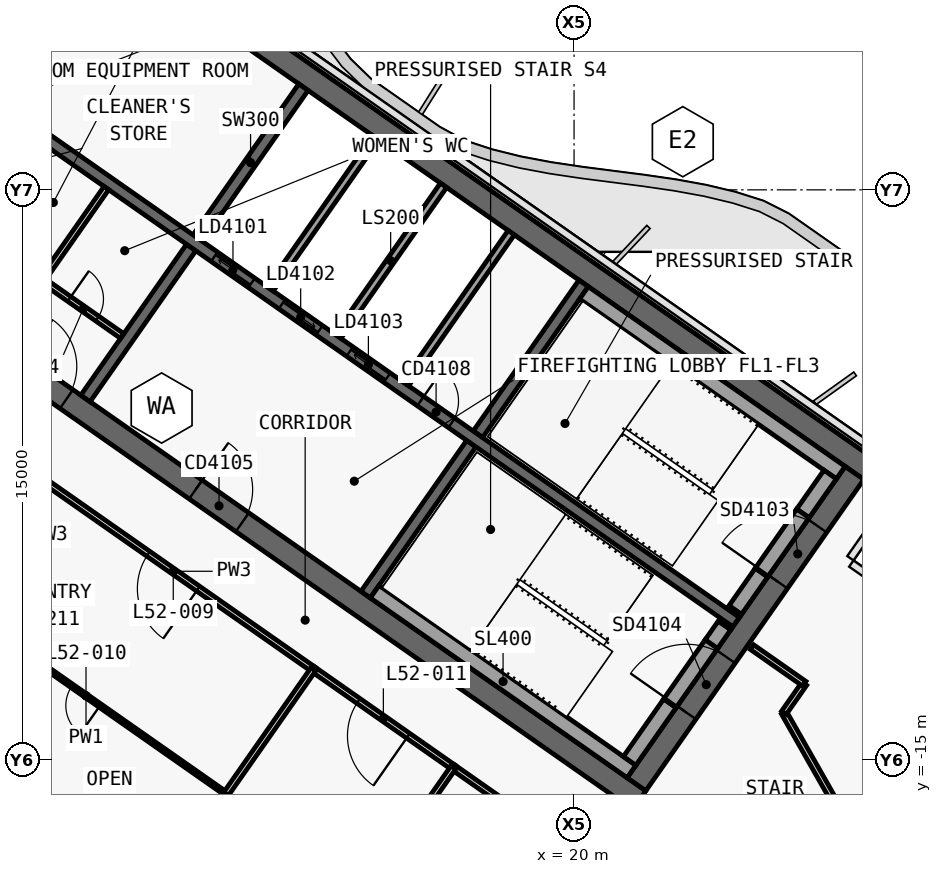
"""IFC4 building model, lengths in metres.
Left out: names, types, materials, properties, quantities, classifications, styles, units other than length and angle.
Written with IfcOpenShell. Run it as: python <this file> out.ifc"""

import sys

from ifc_helpers import new_model, si_unit, direction, frame, frame_2d, origin, place, context, subcontext, project, spatial, polyline, rectangle, outline, extrude, element, fill, save


model = new_model("IFC4")
c1 = context("Model", 3, precision=1e-05, world=origin(), true_north=direction((0.0, 1.0)))
c2 = subcontext(c1, "Body", "Model", "MODEL_VIEW")
j1 = project(units=[si_unit("LENGTHUNIT", "METRE"), si_unit("PLANEANGLEUNIT", "RADIAN")], contexts=[c1])
p1 = place(None, origin())
s1 = spatial("IfcSite", under=j1, at=p1, CompositionType="ELEMENT")
p2 = place(p1, origin())
s2 = spatial("IfcBuilding", under=s1, at=p2, CompositionType="ELEMENT")
p3 = place(p2, frame((0.0, 0.0, 225.4)))
s3 = spatial("IfcBuildingStorey", under=s2, at=p3, CompositionType="ELEMENT", Elevation=225.4)
p4 = place(p3, frame((0.028, 12.066, 0.0), z_axis=(0.0, 0.0, 1.0), x_axis=(0.819151382952, -0.573577380837, 0.0)))
e1 = element("IfcWall", 1, at=p4, inside=s3, PredefinedType="SHEAR", context=c2, shape_type="SweptSolid", body=[
    extrude(outline(polyline([(33.898, 0.3), (0.0, 0.3), (0.42, -0.3), (33.898, -0.3), (33.898, 0.3)])), origin(), (0.0, 0.0, 1.0), 3.9),
])
p5 = place(p3, frame((0.028, -0.874, 0.0), z_axis=(0.0, 0.0, 1.0), x_axis=(0.819150035022, -0.573579305871, 0.0)))
e2 = element("IfcWall", 2, at=p5, inside=s3, PredefinedType="SHEAR", context=c2, shape_type="SweptSolid", body=[
    extrude(outline(polyline([(26.476, 0.3), (0.0, 0.3), (0.42, -0.3), (26.476, -0.3), (26.476, 0.3)])), origin(), (0.0, 0.0, 1.0), 3.9),
])
p6 = place(p5, frame((6.576, 0.0, 0.0)))
e3 = element("IfcOpeningElement", 3, at=p6, cuts=e2, PredefinedType="OPENING", context=c2, shape_type="SweptSolid", body=[
    extrude(rectangle(XDim=1.5, YDim=2.1, at=frame_2d((0.75, 1.05))), frame((0.0, 0.31, 0.0), z_axis=(0.0, -1.0, 0.0), x_axis=(1.0, 0.0, 0.0)), (0.0, 0.0, 1.0), 0.62),
])
p7 = place(p5, frame((12.226, 0.0, 0.0)))
e4 = element("IfcOpeningElement", 4, at=p7, cuts=e2, PredefinedType="OPENING", context=c2, shape_type="SweptSolid", body=[
    extrude(rectangle(XDim=1.5, YDim=2.1, at=frame_2d((0.75, 1.05))), frame((0.0, 0.31, 0.0), z_axis=(0.0, -1.0, 0.0), x_axis=(1.0, 0.0, 0.0)), (0.0, 0.0, 1.0), 0.62),
])
p8 = place(p3, frame((21.642, -15.642, 0.0), z_axis=(0.0, 0.0, 1.0), x_axis=(0.573586866468, 0.819144740944, 0.0)))
e5 = element("IfcWall", 5, at=p8, inside=s3, PredefinedType="SHEAR", context=c2, shape_type="SweptSolid", body=[
    extrude(outline(polyline([(10.0, 0.3), (0.0, 0.3), (0.0, -0.3), (10.0, -0.3), (10.0, 0.3)])), origin(), (0.0, 0.0, 1.0), 3.9),
])
p9 = place(p8, frame((6.5, 0.0, 0.0)))
e6 = element("IfcOpeningElement", 6, at=p9, cuts=e5, PredefinedType="OPENING", context=c2, shape_type="SweptSolid", body=[
    extrude(rectangle(XDim=1.8, YDim=2.1, at=frame_2d((0.9, 1.05))), frame((0.0, 0.31, 0.0), z_axis=(0.0, -1.0, 0.0), x_axis=(1.0, 0.0, 0.0)), (0.0, 0.0, 1.0), 0.62),
])
p10 = place(p8, frame((2.3, 0.0, 0.0)))
e7 = element("IfcOpeningElement", 7, at=p10, cuts=e5, PredefinedType="OPENING", context=c2, shape_type="SweptSolid", body=[
    extrude(rectangle(XDim=1.8, YDim=2.1, at=frame_2d((0.9, 1.05))), frame((0.0, 0.31, 0.0), z_axis=(0.0, -1.0, 0.0), x_axis=(1.0, 0.0, 0.0)), (0.0, 0.0, 1.0), 0.62),
])
p11 = place(p3, frame((7.143, -5.49, 0.0), z_axis=(0.0, 0.0, 1.0), x_axis=(0.573617744349, 0.819123118565, 0.0)))
e8 = element("IfcWall", 8, at=p11, inside=s3, PredefinedType="SHEAR", context=c2, shape_type="SweptSolid", body=[
    extrude(outline(polyline([(0.0, 0.15), (0.0, -0.15), (4.85, -0.15), (4.85, 0.15), (0.0, 0.15)])), origin(), (0.0, 0.0, 1.0), 3.9),
])
p12 = place(p3, frame((10.097, -1.271, 0.0), z_axis=(0.0, 0.0, 1.0), x_axis=(0.573560315113, 0.819163332265, 0.0)))
e9 = element("IfcWall", 9, at=p12, inside=s3, PredefinedType="SHEAR", context=c2, shape_type="SweptSolid", body=[
    extrude(outline(polyline([(4.85, -0.15), (4.85, 0.15), (0.0, 0.15), (0.0, -0.15), (4.85, -0.15)])), origin(), (0.0, 0.0, 1.0), 3.9),
])
p13 = place(p3, frame((14.515, -10.652, 0.0), z_axis=(0.0, 0.0, 1.0), x_axis=(0.573560315113, 0.819163332265, 0.0)))
e10 = element("IfcWall", 10, at=p13, inside=s3, PredefinedType="SHEAR", context=c2, shape_type="SweptSolid", body=[
    extrude(outline(polyline([(0.0, 0.15), (0.0, -0.15), (4.85, -0.15), (4.85, 0.15), (0.0, 0.15)])), origin(), (0.0, 0.0, 1.0), 3.9),
])
p14 = place(p3, frame((17.469, -6.433, 0.0), z_axis=(0.0, 0.0, 1.0), x_axis=(0.573594092424, 0.81913968109, 0.0)))
e11 = element("IfcWall", 11, at=p14, inside=s3, PredefinedType="SHEAR", context=c2, shape_type="SweptSolid", body=[
    extrude(outline(polyline([(4.85, -0.15), (4.85, 0.15), (0.0, 0.15), (0.0, -0.15), (4.85, -0.15)])), origin(), (0.0, 0.0, 1.0), 3.9),
])
p15 = place(p3, frame((2.638, 3.768, 0.0), z_axis=(0.0, 0.0, 1.0), x_axis=(0.819155014212, -0.573572194837, 0.0)))
e12 = element("IfcWall", 12, at=p15, inside=s3, PredefinedType="SHEAR", context=c2, shape_type="SweptSolid", body=[
    extrude(outline(polyline([(0.0, 0.15), (0.0, -0.15), (26.4, -0.15), (26.4, 0.15), (0.0, 0.15)])), origin(), (0.0, 0.0, 1.0), 3.9),
])
p16 = place(p15, frame((9.637, 0.0, 0.0)))
e13 = element("IfcOpeningElement", 13, at=p16, cuts=e12, PredefinedType="OPENING", context=c2, shape_type="SweptSolid", body=[
    extrude(rectangle(XDim=1.2, YDim=2.1, at=frame_2d((0.6, 1.05))), frame((0.0, 0.16, 0.0), z_axis=(0.0, -1.0, 0.0), x_axis=(1.0, 0.0, 0.0)), (0.0, 0.0, 1.0), 0.32),
])
p17 = place(p15, frame((11.812, 0.0, 0.0)))
e14 = element("IfcOpeningElement", 14, at=p17, cuts=e12, PredefinedType="OPENING", context=c2, shape_type="SweptSolid", body=[
    extrude(rectangle(XDim=1.2, YDim=2.1, at=frame_2d((0.6, 1.05))), frame((0.0, 0.16, 0.0), z_axis=(0.0, -1.0, 0.0), x_axis=(1.0, 0.0, 0.0)), (0.0, 0.0, 1.0), 0.32),
])
p18 = place(p15, frame((13.988, 0.0, 0.0)))
e15 = element("IfcOpeningElement", 15, at=p18, cuts=e12, PredefinedType="OPENING", context=c2, shape_type="SweptSolid", body=[
    extrude(rectangle(XDim=1.2, YDim=2.1, at=frame_2d((0.6, 1.05))), frame((0.0, 0.16, 0.0), z_axis=(0.0, -1.0, 0.0), x_axis=(1.0, 0.0, 0.0)), (0.0, 0.0, 1.0), 0.32),
])
p19 = place(p15, frame((16.262, 0.0, 0.0)))
e16 = element("IfcOpeningElement", 16, at=p19, cuts=e12, PredefinedType="OPENING", context=c2, shape_type="SweptSolid", body=[
    extrude(rectangle(XDim=1.0, YDim=2.1, at=frame_2d((0.5, 1.05))), frame((0.0, 0.16, 0.0), z_axis=(0.0, -1.0, 0.0), x_axis=(1.0, 0.0, 0.0)), (0.0, 0.0, 1.0), 0.32),
])
p20 = place(p3, frame((12.001, -2.605, 0.0), z_axis=(0.0, 0.0, 1.0), x_axis=(0.573560315113, 0.819163332265, 0.0)))
e17 = element("IfcWall", 17, at=p20, inside=s3, PredefinedType="SOLIDWALL", context=c2, shape_type="SweptSolid", body=[
    extrude(rectangle(XDim=4.85, YDim=0.2, at=frame_2d((2.425, 0.0))), origin(), (0.0, 0.0, 1.0), 3.9),
])
p21 = place(p3, frame((13.783, -3.852, 0.0), z_axis=(0.0, 0.0, 1.0), x_axis=(0.573594092424, 0.81913968109, 0.0)))
e18 = element("IfcWall", 18, at=p21, inside=s3, PredefinedType="SOLIDWALL", context=c2, shape_type="SweptSolid", body=[
    extrude(rectangle(XDim=4.85, YDim=0.2, at=frame_2d((2.425, 0.0))), origin(), (0.0, 0.0, 1.0), 3.9),
])
p22 = place(p3, frame((15.565, -5.1, 0.0), z_axis=(0.0, 0.0, 1.0), x_axis=(0.573560315113, 0.819163332265, 0.0)))
e19 = element("IfcWall", 19, at=p22, inside=s3, PredefinedType="SOLIDWALL", context=c2, shape_type="SweptSolid", body=[
    extrude(rectangle(XDim=4.85, YDim=0.2, at=frame_2d((2.425, 0.0))), origin(), (0.0, 0.0, 1.0), 3.9),
])
p23 = place(p3, frame((1.516, 0.77, 0.0), z_axis=(0.0, 0.0, 1.0), x_axis=(0.819146424436, -0.573584462249, 0.0)))
e20 = element("IfcWall", 20, at=p23, inside=s3, PredefinedType="PARTITIONING", context=c2, shape_type="SweptSolid", body=[
    extrude(rectangle(XDim=8.05, YDim=0.15, at=frame_2d((4.025, 0.0))), origin(), (0.0, 0.0, 1.0), 3.62),
])
p24 = place(p23, frame((0.7, 0.0, 0.0)))
e21 = element("IfcOpeningElement", 21, at=p24, cuts=e20, PredefinedType="OPENING", context=c2, shape_type="SweptSolid", body=[
    extrude(rectangle(XDim=0.9, YDim=2.1, at=frame_2d((0.45, 1.05))), frame((0.0, 0.085, 0.0), z_axis=(0.0, -1.0, 0.0), x_axis=(1.0, 0.0, 0.0)), (0.0, 0.0, 1.0), 0.17),
])
p25 = place(p23, frame((2.6, 0.0, 0.0)))
e22 = element("IfcOpeningElement", 22, at=p25, cuts=e20, PredefinedType="OPENING", context=c2, shape_type="SweptSolid", body=[
    extrude(rectangle(XDim=0.8, YDim=2.1, at=frame_2d((0.4, 1.05))), frame((0.0, 0.085, 0.0), z_axis=(0.0, -1.0, 0.0), x_axis=(1.0, 0.0, 0.0)), (0.0, 0.0, 1.0), 0.17),
])
p26 = place(p23, frame((4.1, 0.0, 0.0)))
e23 = element("IfcOpeningElement", 23, at=p26, cuts=e20, PredefinedType="OPENING", context=c2, shape_type="SweptSolid", body=[
    extrude(rectangle(XDim=0.9, YDim=2.1, at=frame_2d((0.45, 1.05))), frame((0.0, 0.085, 0.0), z_axis=(0.0, -1.0, 0.0), x_axis=(1.0, 0.0, 0.0)), (0.0, 0.0, 1.0), 0.17),
])
p27 = place(p23, frame((6.35, 0.0, 0.0)))
e24 = element("IfcOpeningElement", 24, at=p27, cuts=e20, PredefinedType="OPENING", context=c2, shape_type="SweptSolid", body=[
    extrude(rectangle(XDim=0.9, YDim=2.1, at=frame_2d((0.45, 1.05))), frame((0.0, 0.085, 0.0), z_axis=(0.0, -1.0, 0.0), x_axis=(1.0, 0.0, 0.0)), (0.0, 0.0, 1.0), 0.17),
])
p28 = place(p3, frame((6.044, -2.309, 0.0), z_axis=(0.0, 0.0, 1.0), x_axis=(0.573564930514, 0.819160100642, 0.0)))
e25 = element("IfcWall", 25, at=p28, inside=s3, PredefinedType="PARTITIONING", context=c2, shape_type="SweptSolid", body=[
    extrude(rectangle(XDim=2.875, YDim=0.15, at=frame_2d((1.438, 0.0))), origin(), (0.0, 0.0, 1.0), 3.62),
])
p29 = place(p3, frame((20.259, -2.71, 0.0), z_axis=(0.0, 0.0, 1.0), x_axis=(0.81914849389, -0.573581506813, 0.0)))
e26 = element("IfcWall", 26, at=p29, inside=s3, PredefinedType="SOLIDWALL", context=c2, shape_type="SweptSolid", body=[
    extrude(rectangle(XDim=8.25, YDim=0.4, at=frame_2d((4.125, 0.0))), origin(), (0.0, 0.0, 1.0), 3.62),
])
p30 = place(p3, frame((24.244, -11.055, 0.0), z_axis=(0.0, 0.0, 1.0), x_axis=(0.573571582932, 0.819155442668, 0.0)))
e27 = element("IfcWall", 27, at=p30, inside=s3, PredefinedType="SOLIDWALL", context=c2, shape_type="SweptSolid", body=[
    extrude(rectangle(XDim=1.2, YDim=0.4, at=frame_2d((0.6, 0.0))), origin(), (0.0, 0.0, 1.0), 3.62),
])
p31 = place(p3, frame((26.022, -8.515, 0.0), z_axis=(0.0, 0.0, 1.0), x_axis=(0.573619628835, 0.819121798889, 0.0)))
e28 = element("IfcWall", 28, at=p31, inside=s3, PredefinedType="SOLIDWALL", context=c2, shape_type="SweptSolid", body=[
    extrude(rectangle(XDim=1.25, YDim=0.4, at=frame_2d((0.625, 0.0))), origin(), (0.0, 0.0, 1.0), 3.62),
])
p32 = place(p3, frame((24.932, -10.072, 2.15), z_axis=(0.0, 0.0, 1.0), x_axis=(0.573591692345, 0.819141361715, 0.0)))
e29 = element("IfcWall", 29, at=p32, inside=s3, PredefinedType="SOLIDWALL", context=c2, shape_type="SweptSolid", body=[
    extrude(rectangle(XDim=1.9, YDim=0.4, at=frame_2d((0.95, 0.0))), origin(), (0.0, 0.0, 1.0), 1.47),
])
p33 = place(p3, frame((14.753, -10.574, 0.0), z_axis=(0.0, 0.0, 1.0), x_axis=(0.819158229677, -0.573567602601, 0.0)))
e30 = element("IfcWall", 30, at=p33, inside=s3, PredefinedType="SOLIDWALL", context=c2, shape_type="SweptSolid", body=[
    extrude(rectangle(XDim=8.25, YDim=0.4, at=frame_2d((4.125, 0.0))), origin(), (0.0, 0.0, 1.0), 3.62),
])
p34 = place(p3, frame((21.462, -15.028, 0.0), z_axis=(0.0, 0.0, 1.0), x_axis=(0.573559770908, 0.819163713305, 0.0)))
e31 = element("IfcWall", 31, at=p34, inside=s3, PredefinedType="SOLIDWALL", context=c2, shape_type="SweptSolid", body=[
    extrude(rectangle(XDim=1.85, YDim=0.4, at=frame_2d((0.925, 0.0))), origin(), (0.0, 0.0, 1.0), 3.62),
])
p35 = place(p3, frame((23.613, -11.956, 0.0), z_axis=(0.0, 0.0, 1.0), x_axis=(0.573435029941, 0.819251039936, 0.0)))
e32 = element("IfcWall", 32, at=p35, inside=s3, PredefinedType="SOLIDWALL", context=c2, shape_type="SweptSolid", body=[
    extrude(rectangle(XDim=0.6, YDim=0.4, at=frame_2d((0.3, 0.0))), origin(), (0.0, 0.0, 1.0), 3.62),
])
p36 = place(p3, frame((22.523, -13.512, 2.15), z_axis=(0.0, 0.0, 1.0), x_axis=(0.573591692345, 0.819141361715, 0.0)))
e33 = element("IfcWall", 33, at=p36, inside=s3, PredefinedType="SOLIDWALL", context=c2, shape_type="SweptSolid", body=[
    extrude(rectangle(XDim=1.9, YDim=0.4, at=frame_2d((0.95, 0.0))), origin(), (0.0, 0.0, 1.0), 1.47),
])
p37 = place(p3, frame((13.14, -12.619, 0.0), z_axis=(0.0, 0.0, 1.0), x_axis=(-0.81915291695, 0.57357519006, 0.0)))
e34 = element("IfcWall", 34, at=p37, inside=s3, PredefinedType="PARTITIONING", context=c2, shape_type="SweptSolid", body=[
    extrude(rectangle(XDim=9.002, YDim=0.15, at=frame_2d((4.501, 0.0))), origin(), (0.0, 0.0, 1.0), 3.05),
])
p38 = place(p37, frame((3.701, 0.0, 0.0)))
e35 = element("IfcOpeningElement", 35, at=p38, cuts=e34, PredefinedType="OPENING", context=c2, shape_type="SweptSolid", body=[
    extrude(rectangle(XDim=1.6, YDim=2.1, at=frame_2d((0.8, 1.05))), frame((0.0, 0.085, 0.0), z_axis=(0.0, -1.0, 0.0), x_axis=(1.0, 0.0, 0.0)), (0.0, 0.0, 1.0), 0.17),
])
p39 = place(p3, frame((16.826, -15.2, 0.0), z_axis=(0.0, 0.0, 1.0), x_axis=(-0.819147870025, 0.573582397772, 0.0)))
e36 = element("IfcWall", 36, at=p39, inside=s3, PredefinedType="PARTITIONING", context=c2, shape_type="SweptSolid", body=[
    extrude(rectangle(XDim=4.504, YDim=0.15, at=frame_2d((2.252, 0.0))), origin(), (0.0, 0.0, 1.0), 3.05),
])
p40 = place(p39, frame((1.452, 0.0, 0.0)))
e37 = element("IfcOpeningElement", 37, at=p40, cuts=e36, PredefinedType="OPENING", context=c2, shape_type="SweptSolid", body=[
    extrude(rectangle(XDim=1.6, YDim=2.1, at=frame_2d((0.8, 1.05))), frame((0.0, 0.085, 0.0), z_axis=(0.0, -1.0, 0.0), x_axis=(1.0, 0.0, 0.0)), (0.0, 0.0, 1.0), 0.17),
])
p41 = place(p3, frame((22.97, -19.502, 0.0), z_axis=(0.0, 0.0, 1.0), x_axis=(-0.819149375276, 0.573580248078, 0.0)))
e38 = element("IfcWall", 38, at=p41, inside=s3, PredefinedType="PARTITIONING", context=c2, shape_type="SweptSolid", body=[
    extrude(rectangle(XDim=7.504, YDim=0.15, at=frame_2d((3.752, 0.0))), origin(), (0.0, 0.0, 1.0), 3.05),
])
p42 = place(p41, frame((2.952, 0.0, 0.0)))
e39 = element("IfcOpeningElement", 39, at=p42, cuts=e38, PredefinedType="OPENING", context=c2, shape_type="SweptSolid", body=[
    extrude(rectangle(XDim=1.6, YDim=2.1, at=frame_2d((0.8, 1.05))), frame((0.0, 0.085, 0.0), z_axis=(0.0, -1.0, 0.0), x_axis=(1.0, 0.0, 0.0)), (0.0, 0.0, 1.0), 0.17),
])
p43 = place(p3, frame((29.617, -20.966, 0.0), z_axis=(0.0, 0.0, 1.0), x_axis=(-0.493827705015, 0.86955977239, 0.0)))
e40 = element("IfcWall", 40, at=p43, inside=s3, PredefinedType="PARTITIONING", context=c2, shape_type="SweptSolid", body=[
    extrude(rectangle(XDim=8.288, YDim=0.15, at=frame_2d((4.144, 0.0))), origin(), (0.0, 0.0, 1.0), 3.0),
])
p44 = place(p43, frame((3.694, 0.0, 0.0)))
e41 = element("IfcOpeningElement", 41, at=p44, cuts=e40, PredefinedType="OPENING", context=c2, shape_type="SweptSolid", body=[
    extrude(rectangle(XDim=0.9, YDim=2.1, at=frame_2d((0.45, 1.05))), frame((0.0, 0.085, 0.0), z_axis=(0.0, -1.0, 0.0), x_axis=(1.0, 0.0, 0.0)), (0.0, 0.0, 1.0), 0.17),
])
p45 = place(p3, frame((25.524, -13.759, 0.0), z_axis=(0.0, 0.0, 1.0), x_axis=(0.573497542524, 0.81920728068, 0.0)))
e42 = element("IfcWall", 42, at=p45, inside=s3, PredefinedType="PARTITIONING", context=c2, shape_type="SweptSolid", body=[
    extrude(rectangle(XDim=0.931, YDim=0.15, at=frame_2d((0.465, 0.0))), origin(), (0.0, 0.0, 1.0), 3.62),
])
p46 = place(p3, frame((26.058, -12.997, 0.0), z_axis=(0.0, 0.0, 1.0), x_axis=(-0.819109000826, 0.573637903879, 0.0)))
e43 = element("IfcWall", 43, at=p46, inside=s3, PredefinedType="PARTITIONING", context=c2, shape_type="SweptSolid", body=[
    extrude(rectangle(XDim=1.68, YDim=0.15, at=frame_2d((0.84, 0.0))), origin(), (0.0, 0.0, 1.0), 3.62),
])
p47 = place(p3, frame((10.844, -15.896, 0.0), z_axis=(0.0, 0.0, 1.0), x_axis=(-0.819141427692, 0.573591598124, 0.0)))
e44 = element("IfcWall", 44, at=p47, inside=s3, PredefinedType="PARTITIONING", context=c2, shape_type="SweptSolid", body=[
    extrude(rectangle(XDim=9.0, YDim=0.1, at=frame_2d((4.5, 0.0))), origin(), (0.0, 0.0, 1.0), 3.05),
])
p48 = place(p47, frame((4.05, 0.0, 0.0)))
e45 = element("IfcOpeningElement", 45, at=p48, cuts=e44, PredefinedType="OPENING", context=c2, shape_type="SweptSolid", body=[
    extrude(rectangle(XDim=0.9, YDim=2.1, at=frame_2d((0.45, 1.05))), frame((0.0, 0.06, 0.0), z_axis=(0.0, -1.0, 0.0), x_axis=(1.0, 0.0, 0.0)), (0.0, 0.0, 1.0), 0.12),
])
p49 = place(p3, frame((10.844, -15.896, 0.0), z_axis=(0.0, 0.0, 1.0), x_axis=(-0.573555012677, -0.819167044889, 0.0)))
e46 = element("IfcWall", 46, at=p49, inside=s3, PredefinedType="PARTITIONING", context=c2, shape_type="SweptSolid", body=[
    extrude(rectangle(XDim=2.829, YDim=0.15, at=frame_2d((1.415, 0.0))), origin(), (0.0, 0.0, 1.0), 3.05),
])
p50 = place(p3, frame((13.139, -12.618, 0.0), z_axis=(0.0, 0.0, 1.0), x_axis=(-0.573556557423, -0.819165963305, 0.0)))
e47 = element("IfcWall", 47, at=p50, inside=s3, PredefinedType="PARTITIONING", context=c2, shape_type="SweptSolid", body=[
    extrude(rectangle(XDim=4.0, YDim=0.15, at=frame_2d((2.0, 0.0))), origin(), (0.0, 0.0, 1.0), 3.05),
])
p51 = place(p3, frame((16.825, -15.199, 0.0), z_axis=(0.0, 0.0, 1.0), x_axis=(-0.573589265117, -0.819143061341, 0.0)))
e48 = element("IfcWall", 48, at=p51, inside=s3, PredefinedType="PARTITIONING", context=c2, shape_type="SweptSolid", body=[
    extrude(rectangle(XDim=4.002, YDim=0.15, at=frame_2d((2.001, 0.0))), origin(), (0.0, 0.0, 1.0), 3.62),
])
p52 = place(p16, origin())
e49 = element("IfcDoor", 49, at=p52, inside=s3, OperationType="SLIDING_TO_LEFT", PredefinedType="DOOR", context=c2, shape_type="SweptSolid", body=[
    extrude(rectangle(XDim=1.2, YDim=2.1, at=frame_2d((0.6, 1.05))), frame((0.0, 0.025, 0.0), z_axis=(0.0, -1.0, 0.0), x_axis=(1.0, 0.0, 0.0)), (0.0, 0.0, 1.0), 0.05),
])
fill(e13, e49)
p53 = place(p17, origin())
e50 = element("IfcDoor", 50, at=p53, inside=s3, OperationType="SLIDING_TO_RIGHT", PredefinedType="DOOR", context=c2, shape_type="SweptSolid", body=[
    extrude(rectangle(XDim=1.2, YDim=2.1, at=frame_2d((0.6, 1.05))), frame((0.0, 0.025, 0.0), z_axis=(0.0, -1.0, 0.0), x_axis=(1.0, 0.0, 0.0)), (0.0, 0.0, 1.0), 0.05),
])
fill(e14, e50)
p54 = place(p18, origin())
e51 = element("IfcDoor", 51, at=p54, inside=s3, OperationType="SLIDING_TO_LEFT", PredefinedType="DOOR", context=c2, shape_type="SweptSolid", body=[
    extrude(rectangle(XDim=1.2, YDim=2.1, at=frame_2d((0.6, 1.05))), frame((0.0, 0.025, 0.0), z_axis=(0.0, -1.0, 0.0), x_axis=(1.0, 0.0, 0.0)), (0.0, 0.0, 1.0), 0.05),
])
fill(e15, e51)
p55 = place(p19, origin())
e52 = element("IfcDoor", 52, at=p55, inside=s3, OperationType="SINGLE_SWING_RIGHT", PredefinedType="DOOR", context=c2, shape_type="SweptSolid", body=[
    extrude(rectangle(XDim=1.0, YDim=2.1, at=frame_2d((0.5, 1.05))), frame((0.0, 0.025, 0.0), z_axis=(0.0, -1.0, 0.0), x_axis=(1.0, 0.0, 0.0)), (0.0, 0.0, 1.0), 0.05),
])
fill(e16, e52)
p56 = place(p27, origin())
e53 = element("IfcDoor", 53, at=p56, inside=s3, OperationType="SINGLE_SWING_RIGHT", PredefinedType="DOOR", context=c2, shape_type="SweptSolid", body=[
    extrude(rectangle(XDim=0.9, YDim=2.1, at=frame_2d((0.45, 1.05))), frame((0.0, 0.025, 0.0), z_axis=(0.0, -1.0, 0.0), x_axis=(1.0, 0.0, 0.0)), (0.0, 0.0, 1.0), 0.05),
])
fill(e24, e53)
p57 = place(p6, origin())
e54 = element("IfcDoor", 54, at=p57, inside=s3, OperationType="SINGLE_SWING_RIGHT", PredefinedType="DOOR", context=c2, shape_type="SweptSolid", body=[
    extrude(rectangle(XDim=1.5, YDim=2.1, at=frame_2d((0.75, 1.05))), frame((0.0, 0.025, 0.0), z_axis=(0.0, -1.0, 0.0), x_axis=(1.0, 0.0, 0.0)), (0.0, 0.0, 1.0), 0.05),
])
fill(e3, e54)
p58 = place(p7, origin())
e55 = element("IfcDoor", 55, at=p58, inside=s3, OperationType="DOUBLE_DOOR_SINGLE_SWING", PredefinedType="DOOR", context=c2, shape_type="SweptSolid", body=[
    extrude(rectangle(XDim=1.5, YDim=2.1, at=frame_2d((0.75, 1.05))), frame((0.0, 0.025, 0.0), z_axis=(0.0, -1.0, 0.0), x_axis=(1.0, 0.0, 0.0)), (0.0, 0.0, 1.0), 0.05),
])
fill(e4, e55)
p59 = place(p9, origin())
e56 = element("IfcDoor", 56, at=p59, inside=s3, OperationType="DOUBLE_DOOR_SINGLE_SWING", PredefinedType="DOOR", context=c2, shape_type="SweptSolid", body=[
    extrude(rectangle(XDim=1.8, YDim=2.1, at=frame_2d((0.9, 1.05))), frame((0.0, 0.025, 0.0), z_axis=(0.0, -1.0, 0.0), x_axis=(1.0, 0.0, 0.0)), (0.0, 0.0, 1.0), 0.05),
])
fill(e6, e56)
p60 = place(p10, origin())
e57 = element("IfcDoor", 57, at=p60, inside=s3, OperationType="DOUBLE_DOOR_SINGLE_SWING", PredefinedType="DOOR", context=c2, shape_type="SweptSolid", body=[
    extrude(rectangle(XDim=1.8, YDim=2.1, at=frame_2d((0.9, 1.05))), frame((0.0, 0.025, 0.0), z_axis=(0.0, -1.0, 0.0), x_axis=(1.0, 0.0, 0.0)), (0.0, 0.0, 1.0), 0.05),
])
fill(e7, e57)
p61 = place(p38, origin())
e58 = element("IfcDoor", 58, at=p61, inside=s3, OperationType="DOUBLE_DOOR_SINGLE_SWING", PredefinedType="DOOR", context=c2, shape_type="SweptSolid", body=[
    extrude(rectangle(XDim=1.6, YDim=2.1, at=frame_2d((0.8, 1.05))), frame((0.0, 0.025, 0.0), z_axis=(0.0, -1.0, 0.0), x_axis=(1.0, 0.0, 0.0)), (0.0, 0.0, 1.0), 0.05),
])
fill(e35, e58)
p62 = place(p48, origin())
e59 = element("IfcDoor", 59, at=p62, inside=s3, OperationType="SINGLE_SWING_LEFT", PredefinedType="DOOR", context=c2, shape_type="SweptSolid", body=[
    extrude(rectangle(XDim=0.9, YDim=2.1, at=frame_2d((0.45, 1.05))), frame((0.0, 0.025, 0.0), z_axis=(0.0, -1.0, 0.0), x_axis=(1.0, 0.0, 0.0)), (0.0, 0.0, 1.0), 0.05),
])
fill(e45, e59)
p63 = place(p40, origin())
e60 = element("IfcDoor", 60, at=p63, inside=s3, OperationType="DOUBLE_DOOR_SINGLE_SWING", PredefinedType="DOOR", context=c2, shape_type="SweptSolid", body=[
    extrude(rectangle(XDim=1.6, YDim=2.1, at=frame_2d((0.8, 1.05))), frame((0.0, 0.025, 0.0), z_axis=(0.0, -1.0, 0.0), x_axis=(1.0, 0.0, 0.0)), (0.0, 0.0, 1.0), 0.05),
])
fill(e37, e60)
save(model, sys.argv[1])
